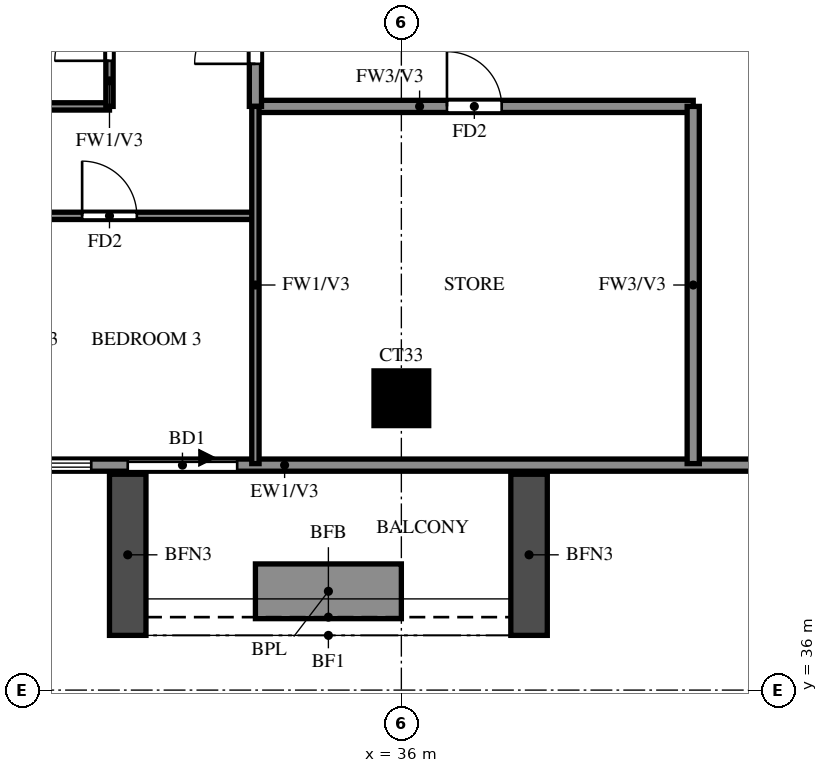
"""IFC4 building model, lengths in metres.
Left out: names, types, materials, properties, quantities, classifications, styles, units other than length and angle.
Written with IfcOpenShell. Run it as: python <this file> out.ifc"""

import sys

from ifc_helpers import new_model, si_unit, direction, frame, frame_2d, origin, origin_2d, place, context, subcontext, project, spatial, rectangle, extrude, source, transform, mapped, element, fill, save


model = new_model("IFC4")
c1 = context("Model", 3, precision=1e-05, world=origin(), true_north=direction((0.0, 1.0)))
c2 = subcontext(c1, "Body", "Model", "MODEL_VIEW")
j1 = project(units=[si_unit("LENGTHUNIT", "METRE"), si_unit("PLANEANGLEUNIT", "RADIAN")], contexts=[c1])
p1 = place(None, origin())
s1 = spatial("IfcSite", under=j1, at=p1, CompositionType="ELEMENT")
p2 = place(p1, origin())
s2 = spatial("IfcBuilding", under=s1, at=p2, CompositionType="ELEMENT")
p3 = place(p2, frame((0.0, 0.0, 225.5)))
s3 = spatial("IfcBuildingStorey", under=s2, at=p3, CompositionType="ELEMENT", Elevation=225.5)
m1 = source(origin(), c2, "Body", "SweptSolid", [
    extrude(rectangle(XDim=0.9, YDim=0.9, at=origin_2d()), origin(), (0.0, 0.0, 1.0), 3.22),
])
p4 = place(p3, frame((36.0, 40.8, 0.0), z_axis=(0.0, 0.0, 1.0), x_axis=(1.0, 0.0, 0.0)))
e1 = element("IfcColumn", 1, at=p4, inside=s3, PredefinedType="COLUMN", context=c2, shape_type="MappedRepresentation", body=[
    mapped(m1, transform((0.0, 0.0, 0.0))),
])
p5 = place(p3, frame((22.2, 39.7, 0.0), z_axis=(0.0, 0.0, 1.0), x_axis=(1.0, 0.0, 0.0)))
e2 = element("IfcWall", 2, at=p5, inside=s3, PredefinedType="SOLIDWALL", context=c2, shape_type="SweptSolid", body=[
    extrude(rectangle(XDim=19.8, YDim=0.2, at=frame_2d((9.9, 0.0))), origin(), (0.0, 0.0, 1.0), 3.22),
])
p6 = place(p5, frame((9.3, 0.0, 0.0)))
e3 = element("IfcOpeningElement", 3, at=p6, cuts=e2, PredefinedType="OPENING", context=c2, shape_type="SweptSolid", body=[
    extrude(rectangle(XDim=1.8, YDim=2.4, at=frame_2d((0.9, 1.2))), frame((0.0, 0.11, 0.0), z_axis=(0.0, -1.0, 0.0), x_axis=(1.0, 0.0, 0.0)), (0.0, 0.0, 1.0), 0.22),
])
p7 = place(p5, frame((0.7, 0.0, 0.6)))
e4 = element("IfcOpeningElement", 4, at=p7, cuts=e2, PredefinedType="OPENING", context=c2, shape_type="SweptSolid", body=[
    extrude(rectangle(XDim=1.8, YDim=2.4, at=frame_2d((0.9, 1.2))), frame((0.0, 0.11, 0.0), z_axis=(0.0, -1.0, 0.0), x_axis=(1.0, 0.0, 0.0)), (0.0, 0.0, 1.0), 0.22),
])
p8 = place(p5, frame((3.6, 0.0, 0.6)))
e5 = element("IfcOpeningElement", 5, at=p8, cuts=e2, PredefinedType="OPENING", context=c2, shape_type="SweptSolid", body=[
    extrude(rectangle(XDim=2.4, YDim=2.4, at=frame_2d((1.2, 1.2))), frame((0.0, 0.11, 0.0), z_axis=(0.0, -1.0, 0.0), x_axis=(1.0, 0.0, 0.0)), (0.0, 0.0, 1.0), 0.22),
])
p9 = place(p5, frame((6.9, 0.0, 0.6)))
e6 = element("IfcOpeningElement", 6, at=p9, cuts=e2, PredefinedType="OPENING", context=c2, shape_type="SweptSolid", body=[
    extrude(rectangle(XDim=1.8, YDim=2.4, at=frame_2d((0.9, 1.2))), frame((0.0, 0.11, 0.0), z_axis=(0.0, -1.0, 0.0), x_axis=(1.0, 0.0, 0.0)), (0.0, 0.0, 1.0), 0.22),
])
for number, where, z_axis, x_axis in (
    (7, (31.5, 39.55, 0.0), (0.0, 0.0, 1.0), (0.0, -1.0, 0.0)),
    (8, (38.1, 39.55, 0.0), (0.0, 0.0, 1.0), (0.0, -1.0, 0.0)),
):
    element("IfcWall", number, at=place(p3, frame(where, z_axis=z_axis, x_axis=x_axis)), inside=s3, PredefinedType="SOLIDWALL", context=c2, shape_type="SweptSolid", body=[
        extrude(rectangle(XDim=2.65, YDim=0.6, at=frame_2d((1.325, 0.0))), origin(), (0.0, 0.0, 1.0), 2.85),
    ])
p10 = place(p3, frame((33.6, 37.625, 0.0), z_axis=(0.0, 0.0, 1.0), x_axis=(1.0, 0.0, 0.0)))
e9 = element("IfcWall", 9, at=p10, inside=s3, PredefinedType="SOLIDWALL", context=c2, shape_type="SweptSolid", body=[
    extrude(rectangle(XDim=2.4, YDim=0.9, at=frame_2d((1.2, 0.0))), origin(), (0.0, 0.0, 1.0), 0.9),
])
p11 = place(p3, frame((33.6, 45.6, 0.0), z_axis=(0.0, 0.0, 1.0), x_axis=(1.0, 0.0, 0.0)))
e10 = element("IfcWall", 10, at=p11, inside=s3, PredefinedType="SOLIDWALL", context=c2, shape_type="SweptSolid", body=[
    extrude(rectangle(XDim=7.2, YDim=0.2, at=frame_2d((3.6, 0.0))), origin(), (0.0, 0.0, 1.0), 3.22),
])
p12 = place(p11, frame((3.15, 0.0, 0.0)))
e11 = element("IfcOpeningElement", 11, at=p12, cuts=e10, PredefinedType="OPENING", context=c2, shape_type="SweptSolid", body=[
    extrude(rectangle(XDim=0.9, YDim=2.1, at=frame_2d((0.45, 1.05))), frame((0.0, 0.11, 0.0), z_axis=(0.0, -1.0, 0.0), x_axis=(1.0, 0.0, 0.0)), (0.0, 0.0, 1.0), 0.22),
])
p13 = place(p3, frame((33.6, 45.6, 0.0), z_axis=(0.0, 0.0, 1.0), x_axis=(0.0, 1.0, 0.0)))
e12 = element("IfcWall", 12, at=p13, inside=s3, PredefinedType="SOLIDWALL", context=c2, shape_type="SweptSolid", body=[
    extrude(rectangle(XDim=12.0, YDim=0.2, at=frame_2d((6.0, 0.0))), origin(), (0.0, 0.0, 1.0), 3.22),
])
p14 = place(p13, frame((0.7, 0.0, 0.0)))
e13 = element("IfcOpeningElement", 13, at=p14, cuts=e12, PredefinedType="OPENING", context=c2, shape_type="SweptSolid", body=[
    extrude(rectangle(XDim=1.0, YDim=2.1, at=frame_2d((0.5, 1.05))), frame((0.0, 0.11, 0.0), z_axis=(0.0, -1.0, 0.0), x_axis=(1.0, 0.0, 0.0)), (0.0, 0.0, 1.0), 0.22),
])
p15 = place(p13, frame((10.3, 0.0, 0.0)))
e14 = element("IfcOpeningElement", 14, at=p15, cuts=e12, PredefinedType="OPENING", context=c2, shape_type="SweptSolid", body=[
    extrude(rectangle(XDim=1.0, YDim=2.1, at=frame_2d((0.5, 1.05))), frame((0.0, 0.11, 0.0), z_axis=(0.0, -1.0, 0.0), x_axis=(1.0, 0.0, 0.0)), (0.0, 0.0, 1.0), 0.22),
])
p16 = place(p3, frame((40.8, 39.725, 0.0), z_axis=(0.0, 0.0, 1.0), x_axis=(0.0, 1.0, 0.0)))
e15 = element("IfcWall", 15, at=p16, inside=s3, PredefinedType="SOLIDWALL", context=c2, shape_type="SweptSolid", body=[
    extrude(rectangle(XDim=5.875, YDim=0.2, at=frame_2d((2.938, 0.0))), origin(), (0.0, 0.0, 1.0), 3.22),
])
p17 = place(p3, frame((25.2, 43.8, 0.0), z_axis=(0.0, 0.0, 1.0), x_axis=(1.0, 0.0, 0.0)))
e16 = element("IfcWall", 16, at=p17, inside=s3, PredefinedType="PARTITIONING", context=c2, shape_type="SweptSolid", body=[
    extrude(rectangle(XDim=8.4, YDim=0.12, at=frame_2d((4.2, 0.0))), origin(), (0.0, 0.0, 1.0), 3.22),
])
p18 = place(p17, frame((1.35, 0.0, 0.0)))
e17 = element("IfcOpeningElement", 17, at=p18, cuts=e16, PredefinedType="OPENING", context=c2, shape_type="SweptSolid", body=[
    extrude(rectangle(XDim=0.9, YDim=2.1, at=frame_2d((0.45, 1.05))), frame((0.0, 0.07, 0.0), z_axis=(0.0, -1.0, 0.0), x_axis=(1.0, 0.0, 0.0)), (0.0, 0.0, 1.0), 0.14),
])
p19 = place(p17, frame((5.55, 0.0, 0.0)))
e18 = element("IfcOpeningElement", 18, at=p19, cuts=e16, PredefinedType="OPENING", context=c2, shape_type="SweptSolid", body=[
    extrude(rectangle(XDim=0.9, YDim=2.1, at=frame_2d((0.45, 1.05))), frame((0.0, 0.07, 0.0), z_axis=(0.0, -1.0, 0.0), x_axis=(1.0, 0.0, 0.0)), (0.0, 0.0, 1.0), 0.14),
])
p20 = place(p3, frame((25.2, 45.6, 0.0), z_axis=(0.0, 0.0, 1.0), x_axis=(1.0, 0.0, 0.0)))
e19 = element("IfcWall", 19, at=p20, inside=s3, PredefinedType="PARTITIONING", context=c2, shape_type="SweptSolid", body=[
    extrude(rectangle(XDim=6.0, YDim=0.12, at=frame_2d((3.0, 0.0))), origin(), (0.0, 0.0, 1.0), 3.22),
])
p21 = place(p20, frame((1.425, 0.0, 0.0)))
e20 = element("IfcOpeningElement", 20, at=p21, cuts=e19, PredefinedType="OPENING", context=c2, shape_type="SweptSolid", body=[
    extrude(rectangle(XDim=0.9, YDim=2.1, at=frame_2d((0.45, 1.05))), frame((0.0, 0.07, 0.0), z_axis=(0.0, -1.0, 0.0), x_axis=(1.0, 0.0, 0.0)), (0.0, 0.0, 1.0), 0.14),
])
p22 = place(p3, frame((31.2, 45.6, 0.0), z_axis=(0.0, 0.0, 1.0), x_axis=(0.0, 1.0, 0.0)))
e21 = element("IfcWall", 21, at=p22, inside=s3, PredefinedType="PARTITIONING", context=c2, shape_type="SweptSolid", body=[
    extrude(rectangle(XDim=2.4, YDim=0.12, at=frame_2d((1.2, 0.0))), origin(), (0.0, 0.0, 1.0), 3.22),
])
p23 = place(p22, frame((0.75, 0.0, 0.0)))
e22 = element("IfcOpeningElement", 22, at=p23, cuts=e21, PredefinedType="OPENING", context=c2, shape_type="SweptSolid", body=[
    extrude(rectangle(XDim=0.9, YDim=2.1, at=frame_2d((0.45, 1.05))), frame((0.0, 0.07, 0.0), z_axis=(0.0, -1.0, 0.0), x_axis=(1.0, 0.0, 0.0)), (0.0, 0.0, 1.0), 0.14),
])
p24 = place(p3, frame((33.6, 39.725, 0.0), z_axis=(0.0, 0.0, 1.0), x_axis=(0.0, 1.0, 0.0)))
e23 = element("IfcWall", 23, at=p24, inside=s3, PredefinedType="PARTITIONING", context=c2, shape_type="SweptSolid", body=[
    extrude(rectangle(XDim=5.875, YDim=0.12, at=frame_2d((2.938, 0.0))), origin(), (0.0, 0.0, 1.0), 3.22),
])
p25 = place(p6, origin())
e24 = element("IfcDoor", 24, at=p25, inside=s3, OperationType="DOUBLE_DOOR_SLIDING", PredefinedType="DOOR", context=c2, shape_type="SweptSolid", body=[
    extrude(rectangle(XDim=1.8, YDim=2.4, at=frame_2d((0.9, 1.2))), frame((0.0, 0.025, 0.0), z_axis=(0.0, -1.0, 0.0), x_axis=(1.0, 0.0, 0.0)), (0.0, 0.0, 1.0), 0.05),
])
fill(e3, e24)
p26 = place(p9, origin())
e25 = element("IfcWindow", 25, at=p26, inside=s3, PartitioningType="DOUBLE_PANEL_VERTICAL", PredefinedType="WINDOW", context=c2, shape_type="SweptSolid", body=[
    extrude(rectangle(XDim=1.8, YDim=2.4, at=frame_2d((0.9, 1.2))), frame((0.0, 0.03, 0.0), z_axis=(0.0, -1.0, 0.0), x_axis=(1.0, 0.0, 0.0)), (0.0, 0.0, 1.0), 0.06),
])
fill(e6, e25)
p27 = place(p14, origin())
e26 = element("IfcDoor", 26, at=p27, inside=s3, OperationType="SINGLE_SWING_RIGHT", PredefinedType="DOOR", context=c2, shape_type="SweptSolid", body=[
    extrude(rectangle(XDim=1.0, YDim=2.1, at=frame_2d((0.5, 1.05))), frame((0.0, 0.025, 0.0), z_axis=(0.0, -1.0, 0.0), x_axis=(1.0, 0.0, 0.0)), (0.0, 0.0, 1.0), 0.05),
])
fill(e13, e26)
p28 = place(p19, origin())
e27 = element("IfcDoor", 27, at=p28, inside=s3, OperationType="SINGLE_SWING_RIGHT", PredefinedType="DOOR", context=c2, shape_type="SweptSolid", body=[
    extrude(rectangle(XDim=0.9, YDim=2.1, at=frame_2d((0.45, 1.05))), frame((0.0, 0.025, 0.0), z_axis=(0.0, -1.0, 0.0), x_axis=(1.0, 0.0, 0.0)), (0.0, 0.0, 1.0), 0.05),
])
fill(e18, e27)
p29 = place(p23, origin())
e28 = element("IfcDoor", 28, at=p29, inside=s3, OperationType="SINGLE_SWING_LEFT", PredefinedType="DOOR", context=c2, shape_type="SweptSolid", body=[
    extrude(rectangle(XDim=0.9, YDim=2.1, at=frame_2d((0.45, 1.05))), frame((0.0, 0.025, 0.0), z_axis=(0.0, -1.0, 0.0), x_axis=(1.0, 0.0, 0.0)), (0.0, 0.0, 1.0), 0.05),
])
fill(e22, e28)
p30 = place(p12, origin())
e29 = element("IfcDoor", 29, at=p30, inside=s3, OperationType="SINGLE_SWING_RIGHT", PredefinedType="DOOR", context=c2, shape_type="SweptSolid", body=[
    extrude(rectangle(XDim=0.9, YDim=2.1, at=frame_2d((0.45, 1.05))), frame((0.0, 0.025, 0.0), z_axis=(0.0, -1.0, 0.0), x_axis=(1.0, 0.0, 0.0)), (0.0, 0.0, 1.0), 0.05),
])
fill(e11, e29)
save(model, sys.argv[1])
